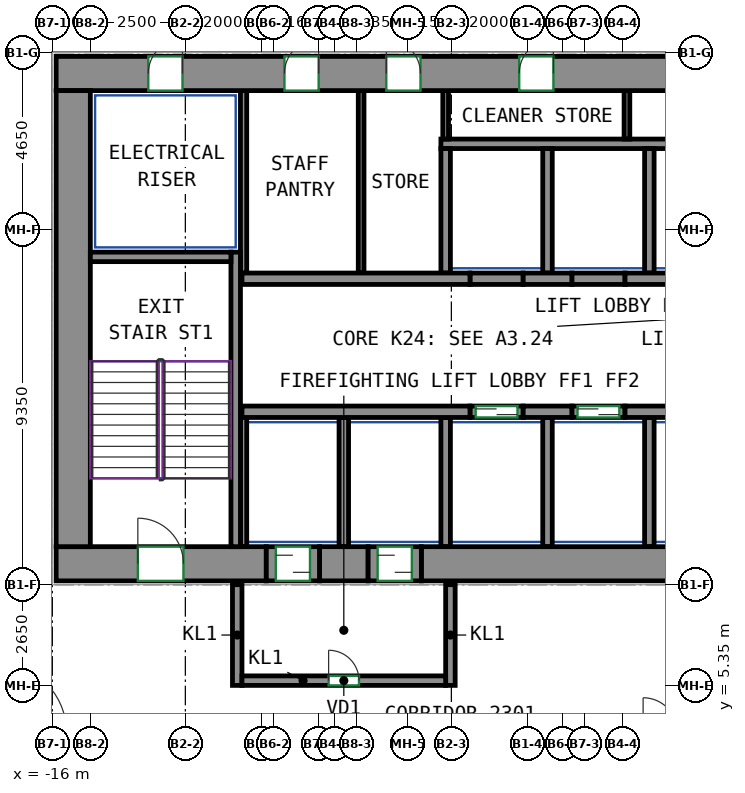
"""IFC4 building model, lengths in metres.
Left out: names, types, materials, properties, quantities, classifications, styles, units other than length and angle.
Written with IfcOpenShell. Run it as: python <this file> out.ifc"""

import sys

from ifc_helpers import new_model, si_unit, direction, frame, frame_2d, origin, place, context, subcontext, project, spatial, rectangle, extrude, source, transform, mapped, element, fill, save


model = new_model("IFC4")
c1 = context("Model", 3, precision=1e-05, world=origin(), true_north=direction((0.0, 1.0)))
c2 = subcontext(c1, "Body", "Model", "MODEL_VIEW")
j1 = project(units=[si_unit("LENGTHUNIT", "METRE"), si_unit("PLANEANGLEUNIT", "RADIAN")], contexts=[c1])
p1 = place(None, origin())
s1 = spatial("IfcSite", under=j1, at=p1, CompositionType="ELEMENT")
p2 = place(p1, origin())
s2 = spatial("IfcBuilding", under=s1, at=p2, CompositionType="ELEMENT")
p3 = place(p2, frame((0.0, 0.0, 100.6)))
s3 = spatial("IfcBuildingStorey", under=s2, at=p3, CompositionType="ELEMENT", Elevation=100.6)
m1 = source(origin(), c2, "Body", "SweptSolid", [
    extrude(rectangle(XDim=5.53, YDim=0.9, at=frame_2d((2.765, 0.0))), origin(), (0.0, 0.0, 1.0), 3.72),
])
p4 = place(p3, frame((-15.9, 8.55, 0.0), z_axis=(0.0, 0.0, 1.0), x_axis=(1.0, 0.0, 0.0)))
e1 = element("IfcWall", 1, at=p4, inside=s3, PredefinedType="SHEAR", context=c2, shape_type="MappedRepresentation", body=[
    mapped(m1, transform((0.0, 0.0, 0.0))),
])
p5 = place(p4, frame((2.15, 0.0, 0.0)))
e2 = element("IfcOpeningElement", 2, at=p5, cuts=e1, PredefinedType="OPENING", context=c2, shape_type="SweptSolid", body=[
    extrude(rectangle(XDim=1.2, YDim=2.1, at=frame_2d((0.6, 1.05))), frame((0.0, 0.46, 0.0), z_axis=(0.0, -1.0, 0.0), x_axis=(1.0, 0.0, 0.0)), (0.0, 0.0, 1.0), 0.92),
])
m2 = source(origin(), c2, "Body", "SweptSolid", [
    extrude(rectangle(XDim=1.28, YDim=0.9, at=frame_2d((0.64, 0.0))), origin(), (0.0, 0.0, 1.0), 3.72),
])
p6 = place(p3, frame((-8.97, 8.55, 0.0), z_axis=(0.0, 0.0, 1.0), x_axis=(1.0, 0.0, 0.0)))
e3 = element("IfcWall", 3, at=p6, inside=s3, PredefinedType="SHEAR", context=c2, shape_type="MappedRepresentation", body=[
    mapped(m2, transform((0.0, 0.0, 0.0))),
])
m3 = source(origin(), c2, "Body", "SweptSolid", [
    extrude(rectangle(XDim=14.18, YDim=0.9, at=frame_2d((7.09, 0.0))), origin(), (0.0, 0.0, 1.0), 3.72),
])
p7 = place(p3, frame((-6.29, 8.55, 0.0), z_axis=(0.0, 0.0, 1.0), x_axis=(1.0, 0.0, 0.0)))
e4 = element("IfcWall", 4, at=p7, inside=s3, PredefinedType="SHEAR", context=c2, shape_type="MappedRepresentation", body=[
    mapped(m3, transform((0.0, 0.0, 0.0))),
])
m4 = source(origin(), c2, "Body", "SweptSolid", [
    extrude(rectangle(XDim=33.9, YDim=0.9, at=frame_2d((16.95, 0.0))), origin(), (0.0, 0.0, 1.0), 3.72),
])
p8 = place(p3, frame((-15.9, 21.45, 0.0), z_axis=(0.0, 0.0, 1.0), x_axis=(1.0, 0.0, 0.0)))
e5 = element("IfcWall", 5, at=p8, inside=s3, PredefinedType="SHEAR", context=c2, shape_type="MappedRepresentation", body=[
    mapped(m4, transform((0.0, 0.0, 0.0))),
])
p9 = place(p8, frame((6.008, 0.0, 0.0)))
e6 = element("IfcOpeningElement", 6, at=p9, cuts=e5, PredefinedType="OPENING", context=c2, shape_type="SweptSolid", body=[
    extrude(rectangle(XDim=0.9, YDim=2.1, at=frame_2d((0.45, 1.05))), frame((0.0, 0.46, 0.0), z_axis=(0.0, -1.0, 0.0), x_axis=(1.0, 0.0, 0.0)), (0.0, 0.0, 1.0), 0.92),
])
p10 = place(p8, frame((8.688, 0.0, 0.0)))
e7 = element("IfcOpeningElement", 7, at=p10, cuts=e5, PredefinedType="OPENING", context=c2, shape_type="SweptSolid", body=[
    extrude(rectangle(XDim=0.9, YDim=2.1, at=frame_2d((0.45, 1.05))), frame((0.0, 0.46, 0.0), z_axis=(0.0, -1.0, 0.0), x_axis=(1.0, 0.0, 0.0)), (0.0, 0.0, 1.0), 0.92),
])
p11 = place(p8, frame((12.185, 0.0, 0.0)))
e8 = element("IfcOpeningElement", 8, at=p11, cuts=e5, PredefinedType="OPENING", context=c2, shape_type="SweptSolid", body=[
    extrude(rectangle(XDim=0.9, YDim=2.1, at=frame_2d((0.45, 1.05))), frame((0.0, 0.46, 0.0), z_axis=(0.0, -1.0, 0.0), x_axis=(1.0, 0.0, 0.0)), (0.0, 0.0, 1.0), 0.92),
])
p12 = place(p8, frame((16.138, 0.0, 0.0)))
e9 = element("IfcOpeningElement", 9, at=p12, cuts=e5, PredefinedType="OPENING", context=c2, shape_type="SweptSolid", body=[
    extrude(rectangle(XDim=0.9, YDim=2.1, at=frame_2d((0.45, 1.05))), frame((0.0, 0.46, 0.0), z_axis=(0.0, -1.0, 0.0), x_axis=(1.0, 0.0, 0.0)), (0.0, 0.0, 1.0), 0.92),
])
p13 = place(p8, frame((20.962, 0.0, 0.0)))
e10 = element("IfcOpeningElement", 10, at=p13, cuts=e5, PredefinedType="OPENING", context=c2, shape_type="SweptSolid", body=[
    extrude(rectangle(XDim=0.9, YDim=2.1, at=frame_2d((0.45, 1.05))), frame((0.0, 0.46, 0.0), z_axis=(0.0, -1.0, 0.0), x_axis=(1.0, 0.0, 0.0)), (0.0, 0.0, 1.0), 0.92),
])
p14 = place(p8, frame((26.389, 0.0, 0.0)))
e11 = element("IfcOpeningElement", 11, at=p14, cuts=e5, PredefinedType="OPENING", context=c2, shape_type="SweptSolid", body=[
    extrude(rectangle(XDim=0.9, YDim=2.1, at=frame_2d((0.45, 1.05))), frame((0.0, 0.46, 0.0), z_axis=(0.0, -1.0, 0.0), x_axis=(1.0, 0.0, 0.0)), (0.0, 0.0, 1.0), 0.92),
])
p15 = place(p8, frame((2.425, 0.0, 0.0)))
e12 = element("IfcOpeningElement", 12, at=p15, cuts=e5, PredefinedType="OPENING", context=c2, shape_type="SweptSolid", body=[
    extrude(rectangle(XDim=0.9, YDim=2.1, at=frame_2d((0.45, 1.05))), frame((0.0, 0.46, 0.0), z_axis=(0.0, -1.0, 0.0), x_axis=(1.0, 0.0, 0.0)), (0.0, 0.0, 1.0), 0.92),
])
p16 = place(p8, frame((30.575, 0.0, 0.0)))
e13 = element("IfcOpeningElement", 13, at=p16, cuts=e5, PredefinedType="OPENING", context=c2, shape_type="SweptSolid", body=[
    extrude(rectangle(XDim=0.9, YDim=2.1, at=frame_2d((0.45, 1.05))), frame((0.0, 0.46, 0.0), z_axis=(0.0, -1.0, 0.0), x_axis=(1.0, 0.0, 0.0)), (0.0, 0.0, 1.0), 0.92),
])
m5 = source(origin(), c2, "Body", "SweptSolid", [
    extrude(rectangle(XDim=12.0, YDim=0.9, at=frame_2d((6.0, 0.0))), origin(), (0.0, 0.0, 1.0), 3.72),
])
p17 = place(p3, frame((-15.45, 9.0, 0.0), z_axis=(0.0, 0.0, 1.0), x_axis=(0.0, 1.0, 0.0)))
e14 = element("IfcWall", 14, at=p17, inside=s3, PredefinedType="SHEAR", context=c2, shape_type="MappedRepresentation", body=[
    mapped(m5, transform((0.0, 0.0, 0.0))),
])
m6 = source(origin(), c2, "Body", "SweptSolid", [
    extrude(rectangle(XDim=7.75, YDim=0.25, at=frame_2d((3.875, 0.0))), origin(), (0.0, 0.0, 1.0), 3.72),
])
p18 = place(p3, frame((-11.175, 9.0, 0.0), z_axis=(0.0, 0.0, 1.0), x_axis=(0.0, 1.0, 0.0)))
e15 = element("IfcWall", 15, at=p18, inside=s3, PredefinedType="SHEAR", context=c2, shape_type="MappedRepresentation", body=[
    mapped(m6, transform((0.0, 0.0, 0.0))),
])
m7 = source(origin(), c2, "Body", "SweptSolid", [
    extrude(rectangle(XDim=3.7, YDim=0.25, at=frame_2d((1.85, 0.0))), origin(), (0.0, 0.0, 1.0), 3.72),
])
p19 = place(p3, frame((-15.0, 16.625, 0.0), z_axis=(0.0, 0.0, 1.0), x_axis=(1.0, 0.0, 0.0)))
e16 = element("IfcWall", 16, at=p19, inside=s3, PredefinedType="SHEAR", context=c2, shape_type="MappedRepresentation", body=[
    mapped(m7, transform((0.0, 0.0, 0.0))),
])
m8 = source(origin(), c2, "Body", "SweptSolid", [
    extrude(rectangle(XDim=6.0, YDim=0.3, at=frame_2d((3.0, 0.0))), origin(), (0.0, 0.0, 1.0), 3.72),
])
p20 = place(p3, frame((-11.01, 12.55, 0.0), z_axis=(0.0, 0.0, 1.0), x_axis=(1.0, 0.0, 0.0)))
e17 = element("IfcWall", 17, at=p20, inside=s3, PredefinedType="SHEAR", context=c2, shape_type="MappedRepresentation", body=[
    mapped(m8, transform((0.0, 0.0, 0.0))),
])
m9 = source(origin(), c2, "Body", "SweptSolid", [
    extrude(rectangle(XDim=1.28, YDim=0.3, at=frame_2d((0.64, 0.0))), origin(), (0.0, 0.0, 1.0), 3.72),
])
for number, where, z_axis, x_axis in (
    (18, (-3.61, 12.55, 0.0), (0.0, 0.0, 1.0), (1.0, 0.0, 0.0)),
    (19, (-0.93, 12.55, 0.0), (0.0, 0.0, 1.0), (1.0, 0.0, 0.0)),
):
    element("IfcWall", number, at=place(p3, frame(where, z_axis=z_axis, x_axis=x_axis)), inside=s3, PredefinedType="SHEAR", context=c2, shape_type="MappedRepresentation", body=[
        mapped(m9, transform((0.0, 0.0, 0.0))),
    ])
p21 = place(p3, frame((-11.01, 16.05, 0.0), z_axis=(0.0, 0.0, 1.0), x_axis=(1.0, 0.0, 0.0)))
e20 = element("IfcWall", 20, at=p21, inside=s3, PredefinedType="SHEAR", context=c2, shape_type="MappedRepresentation", body=[
    mapped(m8, transform((0.0, 0.0, 0.0))),
])
for number, where, z_axis, x_axis in (
    (21, (-3.61, 16.05, 0.0), (0.0, 0.0, 1.0), (1.0, 0.0, 0.0)),
    (22, (-0.93, 16.05, 0.0), (0.0, 0.0, 1.0), (1.0, 0.0, 0.0)),
):
    element("IfcWall", number, at=place(p3, frame(where, z_axis=z_axis, x_axis=x_axis)), inside=s3, PredefinedType="SHEAR", context=c2, shape_type="MappedRepresentation", body=[
        mapped(m9, transform((0.0, 0.0, 0.0))),
    ])
m10 = source(origin(), c2, "Body", "SweptSolid", [
    extrude(rectangle(XDim=1.4, YDim=0.3, at=frame_2d((0.7, 0.0))), origin(), (0.0, 0.0, 1.0), 3.72),
])
p22 = place(p3, frame((-5.01, 12.55, 0.0), z_axis=(0.0, 0.0, 1.0), x_axis=(1.0, 0.0, 0.0)))
e23 = element("IfcWall", 23, at=p22, inside=s3, PredefinedType="PARTITIONING", context=c2, shape_type="MappedRepresentation", body=[
    mapped(m10, transform((0.0, 0.0, 0.0))),
])
p23 = place(p22, frame((0.15, 0.0, 0.0)))
e24 = element("IfcOpeningElement", 24, at=p23, cuts=e23, PredefinedType="OPENING", context=c2, shape_type="SweptSolid", body=[
    extrude(rectangle(XDim=1.1, YDim=2.1, at=frame_2d((0.55, 1.05))), frame((0.0, 0.16, 0.0), z_axis=(0.0, -1.0, 0.0), x_axis=(1.0, 0.0, 0.0)), (0.0, 0.0, 1.0), 0.32),
])
m11 = source(origin(), c2, "Body", "SweptSolid", [
    extrude(rectangle(XDim=1.4, YDim=0.3, at=frame_2d((0.7, 0.0))), origin(), (0.0, 0.0, 1.0), 3.72),
])
p24 = place(p3, frame((-2.33, 12.55, 0.0), z_axis=(0.0, 0.0, 1.0), x_axis=(1.0, 0.0, 0.0)))
e25 = element("IfcWall", 25, at=p24, inside=s3, PredefinedType="PARTITIONING", context=c2, shape_type="MappedRepresentation", body=[
    mapped(m11, transform((0.0, 0.0, 0.0))),
])
p25 = place(p24, frame((0.15, 0.0, 0.0)))
e26 = element("IfcOpeningElement", 26, at=p25, cuts=e25, PredefinedType="OPENING", context=c2, shape_type="SweptSolid", body=[
    extrude(rectangle(XDim=1.1, YDim=2.1, at=frame_2d((0.55, 1.05))), frame((0.0, 0.16, 0.0), z_axis=(0.0, -1.0, 0.0), x_axis=(1.0, 0.0, 0.0)), (0.0, 0.0, 1.0), 0.32),
])
p26 = place(p3, frame((-5.01, 16.05, 0.0), z_axis=(0.0, 0.0, 1.0), x_axis=(1.0, 0.0, 0.0)))
e27 = element("IfcWall", 27, at=p26, inside=s3, PredefinedType="PARTITIONING", context=c2, shape_type="MappedRepresentation", body=[
    mapped(m10, transform((0.0, 0.0, 0.0))),
])
p27 = place(p3, frame((-2.33, 16.05, 0.0), z_axis=(0.0, 0.0, 1.0), x_axis=(1.0, 0.0, 0.0)))
e28 = element("IfcWall", 28, at=p27, inside=s3, PredefinedType="PARTITIONING", context=c2, shape_type="MappedRepresentation", body=[
    mapped(m11, transform((0.0, 0.0, 0.0))),
])
m12 = source(origin(), c2, "Body", "SweptSolid", [
    extrude(rectangle(XDim=2.65, YDim=0.25, at=frame_2d((1.325, 0.0))), origin(), (0.0, 0.0, 1.0), 3.72),
])
for number, where, z_axis, x_axis in (
    (29, (-11.135, 5.35, 0.0), (0.0, 0.0, 1.0), (0.0, 1.0, 0.0)),
    (30, (-5.525, 5.35, 0.0), (0.0, 0.0, 1.0), (0.0, 1.0, 0.0)),
):
    element("IfcWall", number, at=place(p3, frame(where, z_axis=z_axis, x_axis=x_axis)), inside=s3, PredefinedType="PARTITIONING", context=c2, shape_type="MappedRepresentation", body=[
        mapped(m12, transform((0.0, 0.0, 0.0))),
    ])
m13 = source(origin(), c2, "Body", "SweptSolid", [
    extrude(rectangle(XDim=5.36, YDim=0.25, at=frame_2d((2.68, 0.0))), origin(), (0.0, 0.0, 1.0), 3.72),
])
p28 = place(p3, frame((-11.01, 5.475, 0.0), z_axis=(0.0, 0.0, 1.0), x_axis=(1.0, 0.0, 0.0)))
e31 = element("IfcWall", 31, at=p28, inside=s3, PredefinedType="PARTITIONING", context=c2, shape_type="MappedRepresentation", body=[
    mapped(m13, transform((0.0, 0.0, 0.0))),
])
p29 = place(p28, frame((2.28, 0.0, 0.0)))
e32 = element("IfcOpeningElement", 32, at=p29, cuts=e31, PredefinedType="OPENING", context=c2, shape_type="SweptSolid", body=[
    extrude(rectangle(XDim=0.8, YDim=2.0, at=frame_2d((0.4, 1.0))), frame((0.0, 0.135, 0.0), z_axis=(0.0, -1.0, 0.0), x_axis=(1.0, 0.0, 0.0)), (0.0, 0.0, 1.0), 0.27),
])
m14 = source(origin(), c2, "Body", "SweptSolid", [
    extrude(rectangle(XDim=19.01, YDim=0.25, at=frame_2d((9.505, 0.0))), origin(), (0.0, 0.0, 1.0), 3.72),
])
p30 = place(p3, frame((-5.775, 19.6, 0.0), z_axis=(0.0, 0.0, 1.0), x_axis=(1.0, 0.0, 0.0)))
e33 = element("IfcWall", 33, at=p30, inside=s3, PredefinedType="PARTITIONING", context=c2, shape_type="MappedRepresentation", body=[
    mapped(m14, transform((0.0, 0.0, 0.0))),
])
m15 = source(origin(), c2, "Body", "SweptSolid", [
    extrude(rectangle(XDim=4.8, YDim=0.165, at=frame_2d((2.4, 0.0))), origin(), (0.0, 0.0, 1.0), 3.72),
])
p31 = place(p3, frame((-10.968, 16.2, 0.0), z_axis=(0.0, 0.0, 1.0), x_axis=(0.0, 1.0, 0.0)))
e34 = element("IfcWall", 34, at=p31, inside=s3, PredefinedType="PARTITIONING", context=c2, shape_type="MappedRepresentation", body=[
    mapped(m15, transform((0.0, 0.0, 0.0))),
])
m16 = source(origin(), c2, "Body", "SweptSolid", [
    extrude(rectangle(XDim=3.275, YDim=0.25, at=frame_2d((1.638, 0.0))), origin(), (0.0, 0.0, 1.0), 3.72),
])
for number, where, z_axis, x_axis in (
    (35, (-0.29, 16.2, 0.0), (0.0, 0.0, 1.0), (0.0, 1.0, 0.0)),
    (36, (-2.97, 16.2, 0.0), (0.0, 0.0, 1.0), (0.0, 1.0, 0.0)),
    (37, (-5.65, 16.2, 0.0), (0.0, 0.0, 1.0), (0.0, 1.0, 0.0)),
):
    element("IfcWall", number, at=place(p3, frame(where, z_axis=z_axis, x_axis=x_axis)), inside=s3, PredefinedType="PARTITIONING", context=c2, shape_type="MappedRepresentation", body=[
        mapped(m16, transform((0.0, 0.0, 0.0))),
    ])
m17 = source(origin(), c2, "Body", "SweptSolid", [
    extrude(rectangle(XDim=3.4, YDim=0.25, at=frame_2d((1.7, 0.0))), origin(), (0.0, 0.0, 1.0), 3.72),
])
p32 = place(p3, frame((-0.29, 9.0, 0.0), z_axis=(0.0, 0.0, 1.0), x_axis=(0.0, 1.0, 0.0)))
e38 = element("IfcWall", 38, at=p32, inside=s3, PredefinedType="PARTITIONING", context=c2, shape_type="MappedRepresentation", body=[
    mapped(m17, transform((0.0, 0.0, 0.0))),
])
m18 = source(origin(), c2, "Body", "SweptSolid", [
    extrude(rectangle(XDim=3.4, YDim=0.165, at=frame_2d((1.7, 0.0))), origin(), (0.0, 0.0, 1.0), 3.72),
])
p33 = place(p3, frame((-10.968, 9.0, 0.0), z_axis=(0.0, 0.0, 1.0), x_axis=(0.0, 1.0, 0.0)))
e39 = element("IfcWall", 39, at=p33, inside=s3, PredefinedType="PARTITIONING", context=c2, shape_type="MappedRepresentation", body=[
    mapped(m18, transform((0.0, 0.0, 0.0))),
])
for number, where, z_axis, x_axis in (
    (40, (-2.97, 9.0, 0.0), (0.0, 0.0, 1.0), (0.0, 1.0, 0.0)),
    (41, (-5.65, 9.0, 0.0), (0.0, 0.0, 1.0), (0.0, 1.0, 0.0)),
    (42, (-8.33, 9.0, 0.0), (0.0, 0.0, 1.0), (0.0, 1.0, 0.0)),
):
    element("IfcWall", number, at=place(p3, frame(where, z_axis=z_axis, x_axis=x_axis)), inside=s3, PredefinedType="PARTITIONING", context=c2, shape_type="MappedRepresentation", body=[
        mapped(m17, transform((0.0, 0.0, 0.0))),
    ])
m19 = source(origin(), c2, "Body", "SweptSolid", [
    extrude(rectangle(XDim=4.8, YDim=0.15, at=frame_2d((2.4, 0.0))), origin(), (0.0, 0.0, 1.0), 3.72),
])
p34 = place(p3, frame((-7.875, 16.2, 0.0), z_axis=(0.0, 0.0, 1.0), x_axis=(0.0, 1.0, 0.0)))
e43 = element("IfcWall", 43, at=p34, inside=s3, PredefinedType="PARTITIONING", context=c2, shape_type="MappedRepresentation", body=[
    mapped(m19, transform((0.0, 0.0, 0.0))),
])
m20 = source(origin(), c2, "Body", "SweptSolid", [
    extrude(rectangle(XDim=1.275, YDim=0.15, at=frame_2d((0.637, 0.0))), origin(), (0.0, 0.0, 1.0), 3.72),
])
for number, where, z_axis, x_axis in (
    (44, (-5.65, 19.725, 0.0), (0.0, 0.0, 1.0), (0.0, 1.0, 0.0)),
    (45, (-0.88, 19.725, 0.0), (0.0, 0.0, 1.0), (0.0, 1.0, 0.0)),
):
    element("IfcWall", number, at=place(p3, frame(where, z_axis=z_axis, x_axis=x_axis)), inside=s3, PredefinedType="PARTITIONING", context=c2, shape_type="MappedRepresentation", body=[
        mapped(m20, transform((0.0, 0.0, 0.0))),
    ])
m21 = source(origin(), c2, "Body", "SweptSolid", [
    extrude(rectangle(XDim=1.4, YDim=0.9, at=frame_2d((0.7, 0.0))), origin(), (0.0, 0.0, 1.0), 2.7),
])
p35 = place(p3, frame((-10.37, 8.55, 0.0), z_axis=(0.0, 0.0, 1.0), x_axis=(1.0, 0.0, 0.0)))
e46 = element("IfcWall", 46, at=p35, inside=s3, PredefinedType="PARTITIONING", context=c2, shape_type="MappedRepresentation", body=[
    mapped(m21, transform((0.0, 0.0, 0.0))),
])
p36 = place(p35, frame((0.25, 0.0, 0.0)))
e47 = element("IfcOpeningElement", 47, at=p36, cuts=e46, PredefinedType="OPENING", context=c2, shape_type="SweptSolid", body=[
    extrude(rectangle(XDim=0.9, YDim=2.1, at=frame_2d((0.45, 1.05))), frame((0.0, 0.46, 0.0), z_axis=(0.0, -1.0, 0.0), x_axis=(1.0, 0.0, 0.0)), (0.0, 0.0, 1.0), 0.92),
])
m22 = source(origin(), c2, "Body", "SweptSolid", [
    extrude(rectangle(XDim=1.4, YDim=0.9, at=frame_2d((0.7, 0.0))), origin(), (0.0, 0.0, 1.0), 2.7),
])
p37 = place(p3, frame((-7.69, 8.55, 0.0), z_axis=(0.0, 0.0, 1.0), x_axis=(1.0, 0.0, 0.0)))
e48 = element("IfcWall", 48, at=p37, inside=s3, PredefinedType="PARTITIONING", context=c2, shape_type="MappedRepresentation", body=[
    mapped(m22, transform((0.0, 0.0, 0.0))),
])
p38 = place(p37, frame((0.25, 0.0, 0.0)))
e49 = element("IfcOpeningElement", 49, at=p38, cuts=e48, PredefinedType="OPENING", context=c2, shape_type="SweptSolid", body=[
    extrude(rectangle(XDim=0.9, YDim=2.1, at=frame_2d((0.45, 1.05))), frame((0.0, 0.46, 0.0), z_axis=(0.0, -1.0, 0.0), x_axis=(1.0, 0.0, 0.0)), (0.0, 0.0, 1.0), 0.92),
])
p39 = place(p29, origin())
e50 = element("IfcDoor", 50, at=p39, inside=s3, OperationType="SINGLE_SWING_LEFT", PredefinedType="DOOR", context=c2, shape_type="SweptSolid", body=[
    extrude(rectangle(XDim=0.8, YDim=2.0, at=frame_2d((0.4, 1.0))), frame((0.0, 0.025, 0.0), z_axis=(0.0, -1.0, 0.0), x_axis=(1.0, 0.0, 0.0)), (0.0, 0.0, 1.0), 0.05),
])
fill(e32, e50)
p40 = place(p36, origin())
e51 = element("IfcDoor", 51, at=p40, inside=s3, OperationType="SLIDING_TO_LEFT", PredefinedType="DOOR", context=c2, shape_type="SweptSolid", body=[
    extrude(rectangle(XDim=0.9, YDim=2.1, at=frame_2d((0.45, 1.05))), frame((0.0, 0.355, 0.0), z_axis=(0.0, -1.0, 0.0), x_axis=(1.0, 0.0, 0.0)), (0.0, 0.0, 1.0), 0.05),
])
fill(e47, e51)
p41 = place(p38, origin())
e52 = element("IfcDoor", 52, at=p41, inside=s3, OperationType="SLIDING_TO_RIGHT", PredefinedType="DOOR", context=c2, shape_type="SweptSolid", body=[
    extrude(rectangle(XDim=0.9, YDim=2.1, at=frame_2d((0.45, 1.05))), frame((0.0, 0.355, 0.0), z_axis=(0.0, -1.0, 0.0), x_axis=(1.0, 0.0, 0.0)), (0.0, 0.0, 1.0), 0.05),
])
fill(e49, e52)
p42 = place(p23, origin())
e53 = element("IfcDoor", 53, at=p42, inside=s3, OperationType="DOUBLE_DOOR_SLIDING", PredefinedType="DOOR", context=c2, shape_type="SweptSolid", body=[
    extrude(rectangle(XDim=1.1, YDim=2.1, at=frame_2d((0.55, 1.05))), frame((0.0, 0.025, 0.0), z_axis=(0.0, -1.0, 0.0), x_axis=(1.0, 0.0, 0.0)), (0.0, 0.0, 1.0), 0.05),
])
fill(e24, e53)
p43 = place(p25, origin())
e54 = element("IfcDoor", 54, at=p43, inside=s3, OperationType="DOUBLE_DOOR_SLIDING", PredefinedType="DOOR", context=c2, shape_type="SweptSolid", body=[
    extrude(rectangle(XDim=1.1, YDim=2.1, at=frame_2d((0.55, 1.05))), frame((0.0, 0.025, 0.0), z_axis=(0.0, -1.0, 0.0), x_axis=(1.0, 0.0, 0.0)), (0.0, 0.0, 1.0), 0.05),
])
fill(e26, e54)
p44 = place(p9, origin())
e55 = element("IfcDoor", 55, at=p44, inside=s3, OperationType="SINGLE_SWING_RIGHT", PredefinedType="DOOR", context=c2, shape_type="SweptSolid", body=[
    extrude(rectangle(XDim=0.9, YDim=2.1, at=frame_2d((0.45, 1.05))), frame((0.0, -0.305, 0.0), z_axis=(0.0, -1.0, 0.0), x_axis=(1.0, 0.0, 0.0)), (0.0, 0.0, 1.0), 0.05),
])
fill(e6, e55)
p45 = place(p10, origin())
e56 = element("IfcDoor", 56, at=p45, inside=s3, OperationType="SINGLE_SWING_LEFT", PredefinedType="DOOR", context=c2, shape_type="SweptSolid", body=[
    extrude(rectangle(XDim=0.9, YDim=2.1, at=frame_2d((0.45, 1.05))), frame((0.0, -0.305, 0.0), z_axis=(0.0, -1.0, 0.0), x_axis=(1.0, 0.0, 0.0)), (0.0, 0.0, 1.0), 0.05),
])
fill(e7, e56)
p46 = place(p11, origin())
e57 = element("IfcDoor", 57, at=p46, inside=s3, OperationType="SINGLE_SWING_RIGHT", PredefinedType="DOOR", context=c2, shape_type="SweptSolid", body=[
    extrude(rectangle(XDim=0.9, YDim=2.1, at=frame_2d((0.45, 1.05))), frame((0.0, -0.305, 0.0), z_axis=(0.0, -1.0, 0.0), x_axis=(1.0, 0.0, 0.0)), (0.0, 0.0, 1.0), 0.05),
])
fill(e8, e57)
p47 = place(p15, origin())
e58 = element("IfcDoor", 58, at=p47, inside=s3, OperationType="SINGLE_SWING_RIGHT", PredefinedType="DOOR", context=c2, shape_type="SweptSolid", body=[
    extrude(rectangle(XDim=0.9, YDim=2.1, at=frame_2d((0.45, 1.05))), frame((0.0, -0.305, 0.0), z_axis=(0.0, -1.0, 0.0), x_axis=(1.0, 0.0, 0.0)), (0.0, 0.0, 1.0), 0.05),
])
fill(e12, e58)
p48 = place(p5, origin())
e59 = element("IfcDoor", 59, at=p48, inside=s3, OperationType="DOUBLE_DOOR_SINGLE_SWING", PredefinedType="DOOR", context=c2, shape_type="SweptSolid", body=[
    extrude(rectangle(XDim=1.2, YDim=2.1, at=frame_2d((0.6, 1.05))), frame((0.0, 0.355, 0.0), z_axis=(0.0, -1.0, 0.0), x_axis=(1.0, 0.0, 0.0)), (0.0, 0.0, 1.0), 0.05),
])
fill(e2, e59)
save(model, sys.argv[1])
